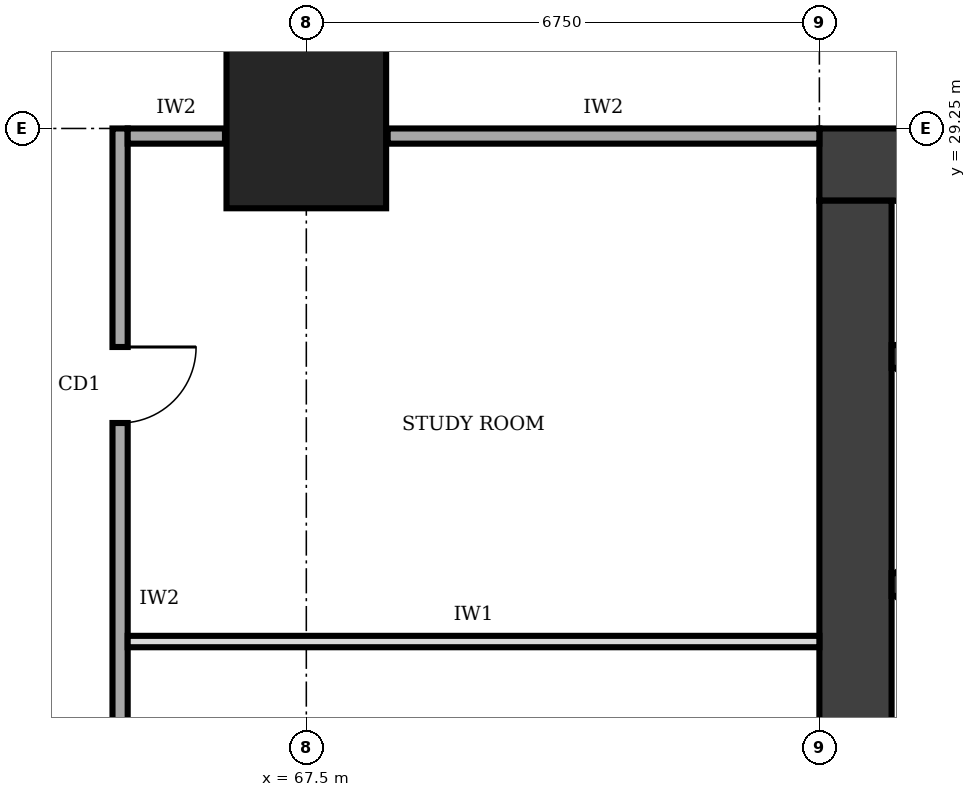
"""IFC4 building model, lengths in metres.
Left out: names, types, materials, properties, quantities, classifications, styles, units other than length and angle.
Written with IfcOpenShell. Run it as: python <this file> out.ifc"""

import sys

from ifc_helpers import new_model, si_unit, direction, frame, frame_2d, origin, origin_2d, place, context, subcontext, project, spatial, rectangle, extrude, element, fill, save


model = new_model("IFC4")
c1 = context("Model", 3, precision=1e-05, world=origin(), true_north=direction((0.0, 1.0)))
c2 = subcontext(c1, "Body", "Model", "MODEL_VIEW")
j1 = project(units=[si_unit("LENGTHUNIT", "METRE"), si_unit("PLANEANGLEUNIT", "RADIAN")], contexts=[c1])
p1 = place(None, origin())
s1 = spatial("IfcSite", under=j1, at=p1, CompositionType="ELEMENT")
p2 = place(p1, origin())
s2 = spatial("IfcBuilding", under=s1, at=p2, CompositionType="ELEMENT")
p3 = place(p2, frame((0.0, 0.0, 97.0)))
s3 = spatial("IfcBuildingStorey", under=s2, at=p3, CompositionType="ELEMENT", Elevation=97.0)
p4 = place(p3, frame((87.75, 28.775, 0.0), z_axis=(0.0, 0.0, 1.0), x_axis=(-1.0, 0.0, 0.0)))
e1 = element("IfcWall", 1, at=p4, inside=s3, PredefinedType="SHEAR", context=c2, shape_type="SweptSolid", body=[
    extrude(rectangle(XDim=13.5, YDim=0.95, at=frame_2d((6.75, 0.0))), origin(), (0.0, 0.0, 1.0), 4.0),
])
p5 = place(p4, frame((4.75, 0.0, 0.0)))
e2 = element("IfcOpeningElement", 2, at=p5, cuts=e1, PredefinedType="OPENING", context=c2, shape_type="SweptSolid", body=[
    extrude(rectangle(XDim=1.8, YDim=2.1, at=frame_2d((0.9, 1.05))), frame((0.0, 0.485, 0.0), z_axis=(0.0, -1.0, 0.0), x_axis=(1.0, 0.0, 0.0)), (0.0, 0.0, 1.0), 0.97),
])
p6 = place(p3, frame((74.725, 28.3, 0.0), z_axis=(0.0, 0.0, 1.0), x_axis=(0.0, -1.0, 0.0)))
e3 = element("IfcWall", 3, at=p6, inside=s3, PredefinedType="SHEAR", context=c2, shape_type="SweptSolid", body=[
    extrude(rectangle(XDim=16.1, YDim=0.95, at=frame_2d((8.05, 0.0))), origin(), (0.0, 0.0, 1.0), 4.0),
])
for number, where, z_axis, x_axis in (
    (4, (75.2, 23.25, 0.0), (0.0, 0.0, 1.0), (1.0, 0.0, 0.0)),
    (5, (75.2, 26.25, 0.0), (0.0, 0.0, 1.0), (1.0, 0.0, 0.0)),
):
    element("IfcWall", number, at=place(p3, frame(where, z_axis=z_axis, x_axis=x_axis)), inside=s3, PredefinedType="SHEAR", context=c2, shape_type="SweptSolid", body=[
        extrude(rectangle(XDim=3.4, YDim=0.3, at=frame_2d((1.7, 0.0))), origin(), (0.0, 0.0, 1.0), 4.0),
    ])
p7 = place(p3, frame((67.5, 29.25, 0.0), z_axis=(0.0, 0.0, 1.0), x_axis=(1.0, 0.0, 0.0)))
e6 = element("IfcColumn", 6, at=p7, inside=s3, PredefinedType="COLUMN", context=c2, shape_type="SweptSolid", body=[
    extrude(rectangle(XDim=2.1, YDim=2.1, at=origin_2d()), origin(), (0.0, 0.0, 1.0), 4.0),
])
p8 = place(p3, frame((65.05, 29.25, 0.0), z_axis=(0.0, 0.0, 1.0), x_axis=(0.0, -1.0, 0.0)))
e7 = element("IfcWall", 7, at=p8, inside=s3, PredefinedType="SOLIDWALL", context=c2, shape_type="SweptSolid", body=[
    extrude(rectangle(XDim=18.0, YDim=0.2, at=frame_2d((9.0, 0.0))), origin(), (0.0, 0.0, 1.0), 3.75),
])
p9 = place(p8, frame((14.125, 0.0, 0.0)))
e8 = element("IfcOpeningElement", 8, at=p9, cuts=e7, PredefinedType="OPENING", context=c2, shape_type="SweptSolid", body=[
    extrude(rectangle(XDim=1.0, YDim=2.1, at=frame_2d((0.5, 1.05))), frame((0.0, 0.11, 0.0), z_axis=(0.0, -1.0, 0.0), x_axis=(1.0, 0.0, 0.0)), (0.0, 0.0, 1.0), 0.22),
])
p10 = place(p8, frame((8.5, 0.0, 0.0)))
e9 = element("IfcOpeningElement", 9, at=p10, cuts=e7, PredefinedType="OPENING", context=c2, shape_type="SweptSolid", body=[
    extrude(rectangle(XDim=1.0, YDim=2.1, at=frame_2d((0.5, 1.05))), frame((0.0, 0.11, 0.0), z_axis=(0.0, -1.0, 0.0), x_axis=(1.0, 0.0, 0.0)), (0.0, 0.0, 1.0), 0.22),
])
p11 = place(p8, frame((2.875, 0.0, 0.0)))
e10 = element("IfcOpeningElement", 10, at=p11, cuts=e7, PredefinedType="OPENING", context=c2, shape_type="SweptSolid", body=[
    extrude(rectangle(XDim=1.0, YDim=2.1, at=frame_2d((0.5, 1.05))), frame((0.0, 0.11, 0.0), z_axis=(0.0, -1.0, 0.0), x_axis=(1.0, 0.0, 0.0)), (0.0, 0.0, 1.0), 0.22),
])
p12 = place(p3, frame((65.15, 29.15, 0.0), z_axis=(0.0, 0.0, 1.0), x_axis=(1.0, 0.0, 0.0)))
e11 = element("IfcWall", 11, at=p12, inside=s3, PredefinedType="SOLIDWALL", context=c2, shape_type="SweptSolid", body=[
    extrude(rectangle(XDim=1.28, YDim=0.2, at=frame_2d((0.64, 0.0))), origin(), (0.0, 0.0, 1.0), 2.85),
])
p13 = place(p3, frame((68.57, 29.15, 0.0), z_axis=(0.0, 0.0, 1.0), x_axis=(1.0, 0.0, 0.0)))
e12 = element("IfcWall", 12, at=p13, inside=s3, PredefinedType="SOLIDWALL", context=c2, shape_type="SweptSolid", body=[
    extrude(rectangle(XDim=5.68, YDim=0.2, at=frame_2d((2.84, 0.0))), origin(), (0.0, 0.0, 1.0), 2.85),
])
p14 = place(p3, frame((65.15, 22.5, 0.0), z_axis=(0.0, 0.0, 1.0), x_axis=(1.0, 0.0, 0.0)))
e13 = element("IfcWall", 13, at=p14, inside=s3, PredefinedType="PARTITIONING", context=c2, shape_type="SweptSolid", body=[
    extrude(rectangle(XDim=9.1, YDim=0.15, at=frame_2d((4.55, 0.0))), origin(), (0.0, 0.0, 1.0), 3.75),
])
p15 = place(p11, origin())
e14 = element("IfcDoor", 14, at=p15, inside=s3, OperationType="SINGLE_SWING_LEFT", PredefinedType="DOOR", context=c2, shape_type="SweptSolid", body=[
    extrude(rectangle(XDim=1.0, YDim=2.1, at=frame_2d((0.5, 1.05))), frame((0.0, 0.025, 0.0), z_axis=(0.0, -1.0, 0.0), x_axis=(1.0, 0.0, 0.0)), (0.0, 0.0, 1.0), 0.05),
])
fill(e10, e14)
save(model, sys.argv[1])
